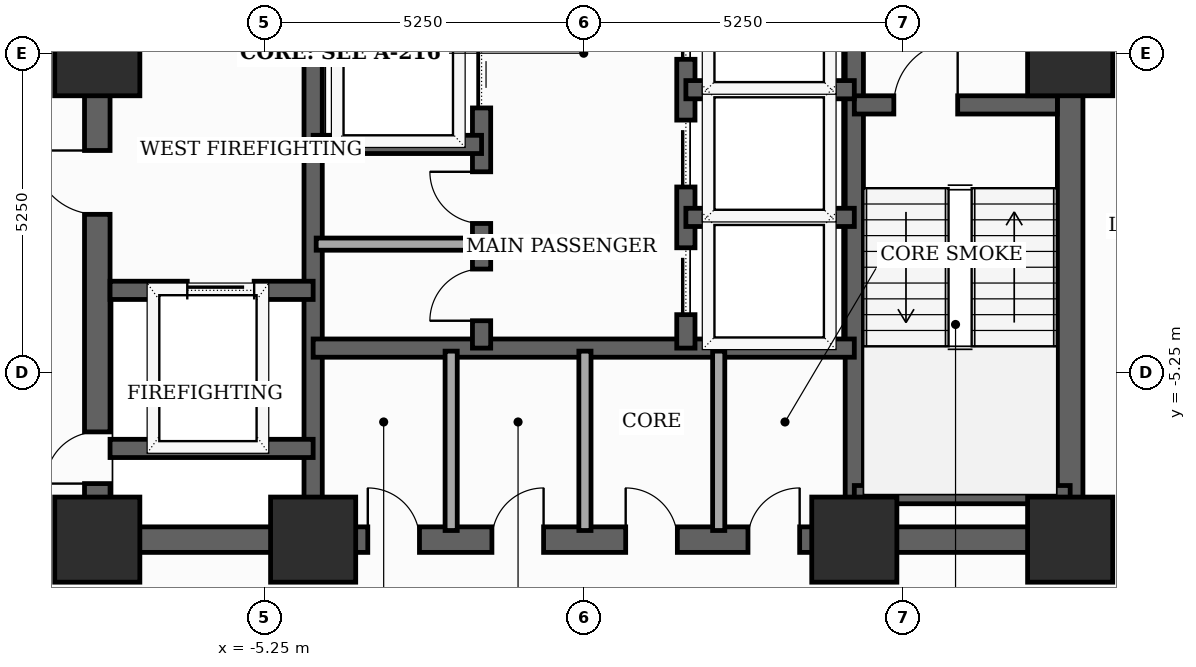
"""IFC4 building model, lengths in metres.
Left out: names, types, materials, properties, quantities, classifications, styles, units other than length and angle.
Written with IfcOpenShell. Run it as: python <this file> out.ifc"""

import sys

from ifc_helpers import new_model, si_unit, direction, frame, frame_2d, origin, origin_2d, place, context, subcontext, project, spatial, rectangle, extrude, element, fill, save


model = new_model("IFC4")
c1 = context("Model", 3, precision=1e-05, world=origin(), true_north=direction((0.0, 1.0)))
c2 = subcontext(c1, "Body", "Model", "MODEL_VIEW")
j1 = project(units=[si_unit("LENGTHUNIT", "METRE"), si_unit("PLANEANGLEUNIT", "RADIAN")], contexts=[c1])
p1 = place(None, origin())
s1 = spatial("IfcSite", under=j1, at=p1, CompositionType="ELEMENT")
p2 = place(p1, origin())
s2 = spatial("IfcBuilding", under=s1, at=p2, CompositionType="ELEMENT")
p3 = place(p2, frame((0.0, 0.0, 116.2)))
s3 = spatial("IfcBuildingStorey", under=s2, at=p3, CompositionType="ELEMENT", Elevation=116.2)
for number, where, z_axis, x_axis in (
    (1, (-8.0, -8.0, 0.0), (0.0, 0.0, 1.0), (1.0, 0.0, 0.0)),
    (2, (-4.45, -8.0, 0.0), (0.0, 0.0, 1.0), (1.0, 0.0, 0.0)),
    (3, (4.45, -8.0, 0.0), (0.0, 0.0, 1.0), (1.0, 0.0, 0.0)),
    (4, (8.0, -8.0, 0.0), (0.0, 0.0, 1.0), (1.0, 0.0, 0.0)),
    (5, (8.0, 0.0, 0.0), (0.0, 0.0, 1.0), (1.0, 0.0, 0.0)),
    (6, (-8.0, 0.0, 0.0), (0.0, 0.0, 1.0), (1.0, 0.0, 0.0)),
):
    element("IfcColumn", number, at=place(p3, frame(where, z_axis=z_axis, x_axis=x_axis)), inside=s3, PredefinedType="COLUMN", context=c2, shape_type="SweptSolid", body=[
        extrude(rectangle(XDim=1.4, YDim=1.4, at=origin_2d()), origin(), (0.0, 0.0, 1.0), 3.7),
    ])
p4 = place(p3, frame((-8.0, -8.0, 0.0), z_axis=(0.0, 0.0, 1.0), x_axis=(0.0, 1.0, 0.0)))
e7 = element("IfcWall", 7, at=p4, inside=s3, PredefinedType="SHEAR", context=c2, shape_type="SweptSolid", body=[
    extrude(rectangle(XDim=16.0, YDim=0.42, at=frame_2d((8.0, 0.0))), origin(), (0.0, 0.0, 1.0), 3.5),
])
p5 = place(p4, frame((0.922, 0.0, 0.0)))
e8 = element("IfcOpeningElement", 8, at=p5, cuts=e7, PredefinedType="OPENING", context=c2, shape_type="SweptSolid", body=[
    extrude(rectangle(XDim=0.85, YDim=2.02, at=frame_2d((0.425, 1.01))), frame((0.0, 0.22, 0.0), z_axis=(0.0, -1.0, 0.0), x_axis=(1.0, 0.0, 0.0)), (0.0, 0.0, 1.0), 0.44),
])
p6 = place(p4, frame((5.35, 0.0, 0.0)))
e9 = element("IfcOpeningElement", 9, at=p6, cuts=e7, PredefinedType="OPENING", context=c2, shape_type="SweptSolid", body=[
    extrude(rectangle(XDim=1.05, YDim=2.15, at=frame_2d((0.525, 1.075))), frame((0.0, 0.22, 0.0), z_axis=(0.0, -1.0, 0.0), x_axis=(1.0, 0.0, 0.0)), (0.0, 0.0, 1.0), 0.44),
])
p7 = place(p3, frame((8.0, -8.0, 0.0), z_axis=(0.0, 0.0, 1.0), x_axis=(0.0, 1.0, 0.0)))
e10 = element("IfcWall", 10, at=p7, inside=s3, PredefinedType="SHEAR", context=c2, shape_type="SweptSolid", body=[
    extrude(rectangle(XDim=16.0, YDim=0.42, at=frame_2d((8.0, 0.0))), origin(), (0.0, 0.0, 1.0), 3.5),
])
p8 = place(p7, frame((9.6, 0.0, 0.0)))
e11 = element("IfcOpeningElement", 11, at=p8, cuts=e10, PredefinedType="OPENING", context=c2, shape_type="SweptSolid", body=[
    extrude(rectangle(XDim=1.05, YDim=2.15, at=frame_2d((0.525, 1.075))), frame((0.0, 0.22, 0.0), z_axis=(0.0, -1.0, 0.0), x_axis=(1.0, 0.0, 0.0)), (0.0, 0.0, 1.0), 0.44),
])
p9 = place(p7, frame((14.229, 0.0, 0.0)))
e12 = element("IfcOpeningElement", 12, at=p9, cuts=e10, PredefinedType="OPENING", context=c2, shape_type="SweptSolid", body=[
    extrude(rectangle(XDim=0.85, YDim=2.02, at=frame_2d((0.425, 1.01))), frame((0.0, 0.22, 0.0), z_axis=(0.0, -1.0, 0.0), x_axis=(1.0, 0.0, 0.0)), (0.0, 0.0, 1.0), 0.44),
])
p10 = place(p3, frame((-8.0, -8.0, 0.0), z_axis=(0.0, 0.0, 1.0), x_axis=(1.0, 0.0, 0.0)))
e13 = element("IfcWall", 13, at=p10, inside=s3, PredefinedType="SHEAR", context=c2, shape_type="SweptSolid", body=[
    extrude(rectangle(XDim=16.0, YDim=0.42, at=frame_2d((8.0, 0.0))), origin(), (0.0, 0.0, 1.0), 3.5),
])
p11 = place(p10, frame((4.449, 0.0, 0.0)))
e14 = element("IfcOpeningElement", 14, at=p11, cuts=e13, PredefinedType="OPENING", context=c2, shape_type="SweptSolid", body=[
    extrude(rectangle(XDim=0.85, YDim=2.02, at=frame_2d((0.425, 1.01))), frame((0.0, 0.22, 0.0), z_axis=(0.0, -1.0, 0.0), x_axis=(1.0, 0.0, 0.0)), (0.0, 0.0, 1.0), 0.44),
])
p12 = place(p10, frame((6.49, 0.0, 0.0)))
e15 = element("IfcOpeningElement", 15, at=p12, cuts=e13, PredefinedType="OPENING", context=c2, shape_type="SweptSolid", body=[
    extrude(rectangle(XDim=0.85, YDim=2.02, at=frame_2d((0.425, 1.01))), frame((0.0, 0.22, 0.0), z_axis=(0.0, -1.0, 0.0), x_axis=(1.0, 0.0, 0.0)), (0.0, 0.0, 1.0), 0.44),
])
p13 = place(p10, frame((8.69, 0.0, 0.0)))
e16 = element("IfcOpeningElement", 16, at=p13, cuts=e13, PredefinedType="OPENING", context=c2, shape_type="SweptSolid", body=[
    extrude(rectangle(XDim=0.85, YDim=2.02, at=frame_2d((0.425, 1.01))), frame((0.0, 0.22, 0.0), z_axis=(0.0, -1.0, 0.0), x_axis=(1.0, 0.0, 0.0)), (0.0, 0.0, 1.0), 0.44),
])
p14 = place(p10, frame((10.701, 0.0, 0.0)))
e17 = element("IfcOpeningElement", 17, at=p14, cuts=e13, PredefinedType="OPENING", context=c2, shape_type="SweptSolid", body=[
    extrude(rectangle(XDim=0.85, YDim=2.02, at=frame_2d((0.425, 1.01))), frame((0.0, 0.22, 0.0), z_axis=(0.0, -1.0, 0.0), x_axis=(1.0, 0.0, 0.0)), (0.0, 0.0, 1.0), 0.44),
])
for number, where, z_axis, x_axis in (
    (18, (-4.45, -7.79, 0.0), (0.0, 0.0, 1.0), (0.0, 1.0, 0.0)),
    (19, (4.45, -7.79, 0.0), (0.0, 0.0, 1.0), (0.0, 1.0, 0.0)),
):
    element("IfcWall", number, at=place(p3, frame(where, z_axis=z_axis, x_axis=x_axis)), inside=s3, PredefinedType="SHEAR", context=c2, shape_type="SweptSolid", body=[
        extrude(rectangle(XDim=15.58, YDim=0.3, at=frame_2d((7.79, 0.0))), origin(), (0.0, 0.0, 1.0), 3.5),
    ])
p15 = place(p3, frame((4.45, -0.85, 0.0), z_axis=(0.0, 0.0, 1.0), x_axis=(1.0, 0.0, 0.0)))
e20 = element("IfcWall", 20, at=p15, inside=s3, PredefinedType="SHEAR", context=c2, shape_type="SweptSolid", body=[
    extrude(rectangle(XDim=3.34, YDim=0.3, at=frame_2d((1.67, 0.0))), origin(), (0.0, 0.0, 1.0), 3.5),
])
p16 = place(p15, frame((0.65, 0.0, 0.0)))
e21 = element("IfcOpeningElement", 21, at=p16, cuts=e20, PredefinedType="OPENING", context=c2, shape_type="SweptSolid", body=[
    extrude(rectangle(XDim=1.05, YDim=2.15, at=frame_2d((0.525, 1.075))), frame((0.0, 0.16, 0.0), z_axis=(0.0, -1.0, 0.0), x_axis=(1.0, 0.0, 0.0)), (0.0, 0.0, 1.0), 0.32),
])
p17 = place(p3, frame((4.45, -7.26, 0.0), z_axis=(0.0, 0.0, 1.0), x_axis=(1.0, 0.0, 0.0)))
e22 = element("IfcWall", 22, at=p17, inside=s3, PredefinedType="SHEAR", context=c2, shape_type="SweptSolid", body=[
    extrude(rectangle(XDim=3.55, YDim=0.3, at=frame_2d((1.775, 0.0))), origin(), (0.0, 0.0, 1.0), 3.5),
])
p18 = place(p3, frame((-7.79, -3.9, 0.0), z_axis=(0.0, 0.0, 1.0), x_axis=(1.0, 0.0, 0.0)))
e23 = element("IfcWall", 23, at=p18, inside=s3, PredefinedType="SHEAR", context=c2, shape_type="SweptSolid", body=[
    extrude(rectangle(XDim=3.34, YDim=0.3, at=frame_2d((1.67, 0.0))), origin(), (0.0, 0.0, 1.0), 3.5),
])
p19 = place(p18, frame((1.27, 0.0, 0.0)))
e24 = element("IfcOpeningElement", 24, at=p19, cuts=e23, PredefinedType="OPENING", context=c2, shape_type="SweptSolid", body=[
    extrude(rectangle(XDim=1.1, YDim=2.1, at=frame_2d((0.55, 1.05))), frame((0.0, 0.16, 0.0), z_axis=(0.0, -1.0, 0.0), x_axis=(1.0, 0.0, 0.0)), (0.0, 0.0, 1.0), 0.32),
])
p20 = place(p3, frame((-7.79, -6.5, 0.0), z_axis=(0.0, 0.0, 1.0), x_axis=(1.0, 0.0, 0.0)))
e25 = element("IfcWall", 25, at=p20, inside=s3, PredefinedType="SHEAR", context=c2, shape_type="SweptSolid", body=[
    extrude(rectangle(XDim=3.34, YDim=0.3, at=frame_2d((1.67, 0.0))), origin(), (0.0, 0.0, 1.0), 3.5),
])
p21 = place(p3, frame((-4.45, -4.85, 0.0), z_axis=(0.0, 0.0, 1.0), x_axis=(1.0, 0.0, 0.0)))
e26 = element("IfcWall", 26, at=p21, inside=s3, PredefinedType="SHEAR", context=c2, shape_type="SweptSolid", body=[
    extrude(rectangle(XDim=8.9, YDim=0.3, at=frame_2d((4.45, 0.0))), origin(), (0.0, 0.0, 1.0), 3.5),
])
p22 = place(p3, frame((-1.68, -4.85, 0.0), z_axis=(0.0, 0.0, 1.0), x_axis=(0.0, 1.0, 0.0)))
e27 = element("IfcWall", 27, at=p22, inside=s3, PredefinedType="SHEAR", context=c2, shape_type="SweptSolid", body=[
    extrude(rectangle(XDim=12.64, YDim=0.3, at=frame_2d((6.32, 0.0))), origin(), (0.0, 0.0, 1.0), 3.5),
])
p23 = place(p22, frame((3.95, 0.0, 0.0)))
e28 = element("IfcOpeningElement", 28, at=p23, cuts=e27, PredefinedType="OPENING", context=c2, shape_type="SweptSolid", body=[
    extrude(rectangle(XDim=1.1, YDim=2.1, at=frame_2d((0.55, 1.05))), frame((0.0, 0.16, 0.0), z_axis=(0.0, -1.0, 0.0), x_axis=(1.0, 0.0, 0.0)), (0.0, 0.0, 1.0), 0.32),
])
p24 = place(p22, frame((6.25, 0.0, 0.0)))
e29 = element("IfcOpeningElement", 29, at=p24, cuts=e27, PredefinedType="OPENING", context=c2, shape_type="SweptSolid", body=[
    extrude(rectangle(XDim=1.1, YDim=2.1, at=frame_2d((0.55, 1.05))), frame((0.0, 0.16, 0.0), z_axis=(0.0, -1.0, 0.0), x_axis=(1.0, 0.0, 0.0)), (0.0, 0.0, 1.0), 0.32),
])
p25 = place(p22, frame((8.55, 0.0, 0.0)))
e30 = element("IfcOpeningElement", 30, at=p25, cuts=e27, PredefinedType="OPENING", context=c2, shape_type="SweptSolid", body=[
    extrude(rectangle(XDim=1.1, YDim=2.1, at=frame_2d((0.55, 1.05))), frame((0.0, 0.16, 0.0), z_axis=(0.0, -1.0, 0.0), x_axis=(1.0, 0.0, 0.0)), (0.0, 0.0, 1.0), 0.32),
])
p26 = place(p22, frame((10.85, 0.0, 0.0)))
e31 = element("IfcOpeningElement", 31, at=p26, cuts=e27, PredefinedType="OPENING", context=c2, shape_type="SweptSolid", body=[
    extrude(rectangle(XDim=1.1, YDim=2.1, at=frame_2d((0.55, 1.05))), frame((0.0, 0.16, 0.0), z_axis=(0.0, -1.0, 0.0), x_axis=(1.0, 0.0, 0.0)), (0.0, 0.0, 1.0), 0.32),
])
p27 = place(p22, frame((0.45, 0.0, 0.0)))
e32 = element("IfcOpeningElement", 32, at=p27, cuts=e27, PredefinedType="OPENING", context=c2, shape_type="SweptSolid", body=[
    extrude(rectangle(XDim=0.85, YDim=2.02, at=frame_2d((0.425, 1.01))), frame((0.0, 0.16, 0.0), z_axis=(0.0, -1.0, 0.0), x_axis=(1.0, 0.0, 0.0)), (0.0, 0.0, 1.0), 0.32),
])
p28 = place(p22, frame((2.05, 0.0, 0.0)))
e33 = element("IfcOpeningElement", 33, at=p28, cuts=e27, PredefinedType="OPENING", context=c2, shape_type="SweptSolid", body=[
    extrude(rectangle(XDim=0.85, YDim=2.02, at=frame_2d((0.425, 1.01))), frame((0.0, 0.16, 0.0), z_axis=(0.0, -1.0, 0.0), x_axis=(1.0, 0.0, 0.0)), (0.0, 0.0, 1.0), 0.32),
])
p29 = place(p3, frame((1.68, -4.85, 0.0), z_axis=(0.0, 0.0, 1.0), x_axis=(0.0, 1.0, 0.0)))
e34 = element("IfcWall", 34, at=p29, inside=s3, PredefinedType="SHEAR", context=c2, shape_type="SweptSolid", body=[
    extrude(rectangle(XDim=12.64, YDim=0.3, at=frame_2d((6.32, 0.0))), origin(), (0.0, 0.0, 1.0), 3.5),
])
p30 = place(p29, frame((0.55, 0.0, 0.0)))
e35 = element("IfcOpeningElement", 35, at=p30, cuts=e34, PredefinedType="OPENING", context=c2, shape_type="SweptSolid", body=[
    extrude(rectangle(XDim=1.1, YDim=2.1, at=frame_2d((0.55, 1.05))), frame((0.0, 0.16, 0.0), z_axis=(0.0, -1.0, 0.0), x_axis=(1.0, 0.0, 0.0)), (0.0, 0.0, 1.0), 0.32),
])
p31 = place(p29, frame((2.65, 0.0, 0.0)))
e36 = element("IfcOpeningElement", 36, at=p31, cuts=e34, PredefinedType="OPENING", context=c2, shape_type="SweptSolid", body=[
    extrude(rectangle(XDim=1.1, YDim=2.1, at=frame_2d((0.55, 1.05))), frame((0.0, 0.16, 0.0), z_axis=(0.0, -1.0, 0.0), x_axis=(1.0, 0.0, 0.0)), (0.0, 0.0, 1.0), 0.32),
])
p32 = place(p29, frame((4.75, 0.0, 0.0)))
e37 = element("IfcOpeningElement", 37, at=p32, cuts=e34, PredefinedType="OPENING", context=c2, shape_type="SweptSolid", body=[
    extrude(rectangle(XDim=1.1, YDim=2.1, at=frame_2d((0.55, 1.05))), frame((0.0, 0.16, 0.0), z_axis=(0.0, -1.0, 0.0), x_axis=(1.0, 0.0, 0.0)), (0.0, 0.0, 1.0), 0.32),
])
p33 = place(p29, frame((6.85, 0.0, 0.0)))
e38 = element("IfcOpeningElement", 38, at=p33, cuts=e34, PredefinedType="OPENING", context=c2, shape_type="SweptSolid", body=[
    extrude(rectangle(XDim=1.1, YDim=2.1, at=frame_2d((0.55, 1.05))), frame((0.0, 0.16, 0.0), z_axis=(0.0, -1.0, 0.0), x_axis=(1.0, 0.0, 0.0)), (0.0, 0.0, 1.0), 0.32),
])
p34 = place(p29, frame((8.95, 0.0, 0.0)))
e39 = element("IfcOpeningElement", 39, at=p34, cuts=e34, PredefinedType="OPENING", context=c2, shape_type="SweptSolid", body=[
    extrude(rectangle(XDim=1.1, YDim=2.1, at=frame_2d((0.55, 1.05))), frame((0.0, 0.16, 0.0), z_axis=(0.0, -1.0, 0.0), x_axis=(1.0, 0.0, 0.0)), (0.0, 0.0, 1.0), 0.32),
])
p35 = place(p29, frame((11.05, 0.0, 0.0)))
e40 = element("IfcOpeningElement", 40, at=p35, cuts=e34, PredefinedType="OPENING", context=c2, shape_type="SweptSolid", body=[
    extrude(rectangle(XDim=1.1, YDim=2.1, at=frame_2d((0.55, 1.05))), frame((0.0, 0.16, 0.0), z_axis=(0.0, -1.0, 0.0), x_axis=(1.0, 0.0, 0.0)), (0.0, 0.0, 1.0), 0.32),
])
for number, where, z_axis, x_axis in (
    (41, (-4.45, -1.5, 0.0), (0.0, 0.0, 1.0), (1.0, 0.0, 0.0)),
    (42, (1.68, -2.7, 0.0), (0.0, 0.0, 1.0), (1.0, 0.0, 0.0)),
    (43, (1.68, -0.6, 0.0), (0.0, 0.0, 1.0), (1.0, 0.0, 0.0)),
):
    element("IfcWall", number, at=place(p3, frame(where, z_axis=z_axis, x_axis=x_axis)), inside=s3, PredefinedType="SHEAR", context=c2, shape_type="SweptSolid", body=[
        extrude(rectangle(XDim=2.77, YDim=0.3, at=frame_2d((1.385, 0.0))), origin(), (0.0, 0.0, 1.0), 3.5),
    ])
for number, where, z_axis, x_axis in (
    (44, (-2.18, -7.85, 0.0), (0.0, 0.0, 1.0), (0.0, 1.0, 0.0)),
    (45, (0.02, -7.85, 0.0), (0.0, 0.0, 1.0), (0.0, 1.0, 0.0)),
    (46, (2.22, -7.85, 0.0), (0.0, 0.0, 1.0), (0.0, 1.0, 0.0)),
):
    element("IfcWall", number, at=place(p3, frame(where, z_axis=z_axis, x_axis=x_axis)), inside=s3, PredefinedType="SOLIDWALL", context=c2, shape_type="SweptSolid", body=[
        extrude(rectangle(XDim=2.95, YDim=0.2, at=frame_2d((1.475, 0.0))), origin(), (0.0, 0.0, 1.0), 2.885),
    ])
p36 = place(p3, frame((-4.4, -3.14, 0.0), z_axis=(0.0, 0.0, 1.0), x_axis=(1.0, 0.0, 0.0)))
e47 = element("IfcWall", 47, at=p36, inside=s3, PredefinedType="SOLIDWALL", context=c2, shape_type="SweptSolid", body=[
    extrude(rectangle(XDim=2.68, YDim=0.2, at=frame_2d((1.34, 0.0))), origin(), (0.0, 0.0, 1.0), 3.5),
])
p37 = place(p5, origin())
e48 = element("IfcDoor", 48, at=p37, inside=s3, OperationType="SINGLE_SWING_LEFT", PredefinedType="TRAPDOOR", context=c2, shape_type="SweptSolid", body=[
    extrude(rectangle(XDim=0.85, YDim=2.02, at=frame_2d((0.425, 1.01))), frame((0.0, 0.025, 0.0), z_axis=(0.0, -1.0, 0.0), x_axis=(1.0, 0.0, 0.0)), (0.0, 0.0, 1.0), 0.05),
])
fill(e8, e48)
p38 = place(p6, origin())
e49 = element("IfcDoor", 49, at=p38, inside=s3, OperationType="SINGLE_SWING_RIGHT", PredefinedType="DOOR", context=c2, shape_type="SweptSolid", body=[
    extrude(rectangle(XDim=1.05, YDim=2.15, at=frame_2d((0.525, 1.075))), frame((0.0, 0.025, 0.0), z_axis=(0.0, -1.0, 0.0), x_axis=(1.0, 0.0, 0.0)), (0.0, 0.0, 1.0), 0.05),
])
fill(e9, e49)
p39 = place(p11, origin())
e50 = element("IfcDoor", 50, at=p39, inside=s3, OperationType="SINGLE_SWING_LEFT", PredefinedType="TRAPDOOR", context=c2, shape_type="SweptSolid", body=[
    extrude(rectangle(XDim=0.85, YDim=2.02, at=frame_2d((0.425, 1.01))), frame((0.0, 0.025, 0.0), z_axis=(0.0, -1.0, 0.0), x_axis=(1.0, 0.0, 0.0)), (0.0, 0.0, 1.0), 0.05),
])
fill(e14, e50)
p40 = place(p12, origin())
e51 = element("IfcDoor", 51, at=p40, inside=s3, OperationType="SINGLE_SWING_RIGHT", PredefinedType="TRAPDOOR", context=c2, shape_type="SweptSolid", body=[
    extrude(rectangle(XDim=0.85, YDim=2.02, at=frame_2d((0.425, 1.01))), frame((0.0, 0.025, 0.0), z_axis=(0.0, -1.0, 0.0), x_axis=(1.0, 0.0, 0.0)), (0.0, 0.0, 1.0), 0.05),
])
fill(e15, e51)
p41 = place(p13, origin())
e52 = element("IfcDoor", 52, at=p41, inside=s3, OperationType="SINGLE_SWING_LEFT", PredefinedType="TRAPDOOR", context=c2, shape_type="SweptSolid", body=[
    extrude(rectangle(XDim=0.85, YDim=2.02, at=frame_2d((0.425, 1.01))), frame((0.0, 0.025, 0.0), z_axis=(0.0, -1.0, 0.0), x_axis=(1.0, 0.0, 0.0)), (0.0, 0.0, 1.0), 0.05),
])
fill(e16, e52)
p42 = place(p14, origin())
e53 = element("IfcDoor", 53, at=p42, inside=s3, OperationType="SINGLE_SWING_RIGHT", PredefinedType="TRAPDOOR", context=c2, shape_type="SweptSolid", body=[
    extrude(rectangle(XDim=0.85, YDim=2.02, at=frame_2d((0.425, 1.01))), frame((0.0, 0.025, 0.0), z_axis=(0.0, -1.0, 0.0), x_axis=(1.0, 0.0, 0.0)), (0.0, 0.0, 1.0), 0.05),
])
fill(e17, e53)
p43 = place(p16, origin())
e54 = element("IfcDoor", 54, at=p43, inside=s3, OperationType="SINGLE_SWING_RIGHT", PredefinedType="DOOR", context=c2, shape_type="SweptSolid", body=[
    extrude(rectangle(XDim=1.05, YDim=2.15, at=frame_2d((0.525, 1.075))), frame((0.0, 0.025, 0.0), z_axis=(0.0, -1.0, 0.0), x_axis=(1.0, 0.0, 0.0)), (0.0, 0.0, 1.0), 0.05),
])
fill(e21, e54)
p44 = place(p19, origin())
e55 = element("IfcDoor", 55, at=p44, inside=s3, OperationType="SLIDING_TO_LEFT", PredefinedType="DOOR", context=c2, shape_type="SweptSolid", body=[
    extrude(rectangle(XDim=1.1, YDim=2.1, at=frame_2d((0.55, 1.05))), frame((0.0, 0.025, 0.0), z_axis=(0.0, -1.0, 0.0), x_axis=(1.0, 0.0, 0.0)), (0.0, 0.0, 1.0), 0.05),
])
fill(e24, e55)
p45 = place(p23, origin())
e56 = element("IfcDoor", 56, at=p45, inside=s3, OperationType="SLIDING_TO_LEFT", PredefinedType="DOOR", context=c2, shape_type="SweptSolid", body=[
    extrude(rectangle(XDim=1.1, YDim=2.1, at=frame_2d((0.55, 1.05))), frame((0.0, 0.025, 0.0), z_axis=(0.0, -1.0, 0.0), x_axis=(1.0, 0.0, 0.0)), (0.0, 0.0, 1.0), 0.05),
])
fill(e28, e56)
p46 = place(p27, origin())
e57 = element("IfcDoor", 57, at=p46, inside=s3, OperationType="SINGLE_SWING_LEFT", PredefinedType="TRAPDOOR", context=c2, shape_type="SweptSolid", body=[
    extrude(rectangle(XDim=0.85, YDim=2.02, at=frame_2d((0.425, 1.01))), frame((0.0, 0.025, 0.0), z_axis=(0.0, -1.0, 0.0), x_axis=(1.0, 0.0, 0.0)), (0.0, 0.0, 1.0), 0.05),
])
fill(e32, e57)
p47 = place(p28, origin())
e58 = element("IfcDoor", 58, at=p47, inside=s3, OperationType="SINGLE_SWING_RIGHT", PredefinedType="TRAPDOOR", context=c2, shape_type="SweptSolid", body=[
    extrude(rectangle(XDim=0.85, YDim=2.02, at=frame_2d((0.425, 1.01))), frame((0.0, 0.025, 0.0), z_axis=(0.0, -1.0, 0.0), x_axis=(1.0, 0.0, 0.0)), (0.0, 0.0, 1.0), 0.05),
])
fill(e33, e58)
p48 = place(p30, origin())
e59 = element("IfcDoor", 59, at=p48, inside=s3, OperationType="SLIDING_TO_LEFT", PredefinedType="DOOR", context=c2, shape_type="SweptSolid", body=[
    extrude(rectangle(XDim=1.1, YDim=2.1, at=frame_2d((0.55, 1.05))), frame((0.0, 0.025, 0.0), z_axis=(0.0, -1.0, 0.0), x_axis=(1.0, 0.0, 0.0)), (0.0, 0.0, 1.0), 0.05),
])
fill(e35, e59)
p49 = place(p31, origin())
e60 = element("IfcDoor", 60, at=p49, inside=s3, OperationType="SLIDING_TO_LEFT", PredefinedType="DOOR", context=c2, shape_type="SweptSolid", body=[
    extrude(rectangle(XDim=1.1, YDim=2.1, at=frame_2d((0.55, 1.05))), frame((0.0, 0.025, 0.0), z_axis=(0.0, -1.0, 0.0), x_axis=(1.0, 0.0, 0.0)), (0.0, 0.0, 1.0), 0.05),
])
fill(e36, e60)
p50 = place(p32, origin())
e61 = element("IfcDoor", 61, at=p50, inside=s3, OperationType="SLIDING_TO_LEFT", PredefinedType="DOOR", context=c2, shape_type="SweptSolid", body=[
    extrude(rectangle(XDim=1.1, YDim=2.1, at=frame_2d((0.55, 1.05))), frame((0.0, 0.025, 0.0), z_axis=(0.0, -1.0, 0.0), x_axis=(1.0, 0.0, 0.0)), (0.0, 0.0, 1.0), 0.05),
])
fill(e37, e61)
save(model, sys.argv[1])
